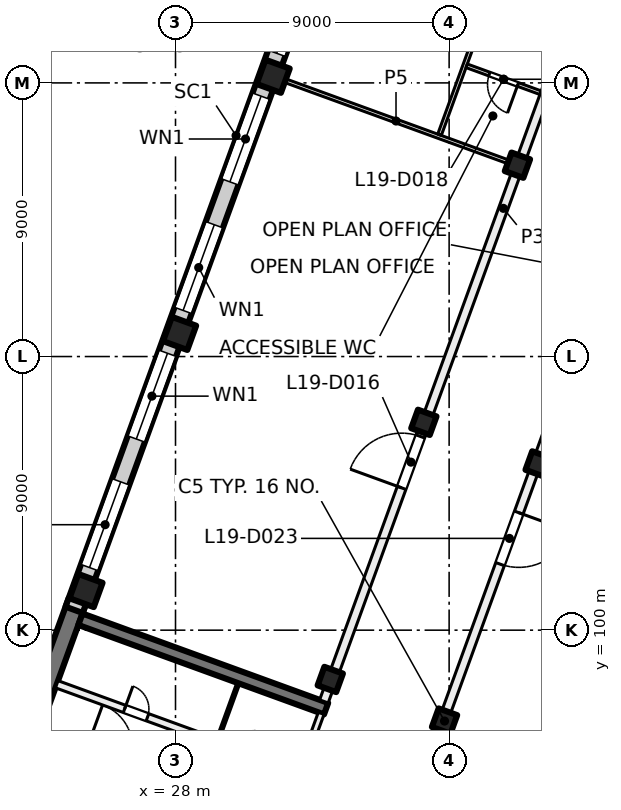
"""IFC4 building model, lengths in metres.
Left out: names, types, materials, properties, quantities, classifications, styles, units other than length and angle.
Written with IfcOpenShell. Run it as: python <this file> out.ifc"""

import sys

from ifc_helpers import new_model, si_unit, direction, frame, frame_2d, origin, origin_2d, place, context, subcontext, project, spatial, rectangle, extrude, element, fill, save


model = new_model("IFC4")
c1 = context("Model", 3, precision=1e-05, world=origin(), true_north=direction((0.0, 1.0)))
c2 = subcontext(c1, "Body", "Model", "MODEL_VIEW")
j1 = project(units=[si_unit("LENGTHUNIT", "METRE"), si_unit("PLANEANGLEUNIT", "RADIAN")], contexts=[c1])
p1 = place(None, origin())
s1 = spatial("IfcSite", under=j1, at=p1, CompositionType="ELEMENT")
p2 = place(p1, origin())
s2 = spatial("IfcBuilding", under=s1, at=p2, CompositionType="ELEMENT")
p3 = place(p2, frame((0.0, 0.0, 85.0)))
s3 = spatial("IfcBuildingStorey", under=s2, at=p3, CompositionType="ELEMENT", Elevation=85.0)
for number, where, z_axis, x_axis in (
    (1, (39.927, 105.468, 0.0), (0.0, 0.0, 1.0), (-0.342, -0.94, 0.0)),
    (2, (36.849, 97.011, 0.0), (0.0, 0.0, 1.0), (-0.342, -0.94, 0.0)),
    (3, (39.247, 115.293, 0.0), (0.0, 0.0, 1.0), (-0.342, -0.94, 0.0)),
    (4, (36.169, 106.836, 0.0), (0.0, 0.0, 1.0), (-0.342, -0.94, 0.0)),
    (5, (33.091, 98.379, 0.0), (0.0, 0.0, 1.0), (-0.342, -0.94, 0.0)),
):
    element("IfcColumn", number, at=place(p3, frame(where, z_axis=z_axis, x_axis=x_axis)), inside=s3, PredefinedType="COLUMN", context=c2, shape_type="SweptSolid", body=[
        extrude(rectangle(XDim=0.65, YDim=0.65, at=origin_2d()), origin(), (0.0, 0.0, 1.0), 4.0),
    ])
for number, where, z_axis, x_axis in (
    (6, (31.212, 118.218, 0.0), (0.0, 0.0, 1.0), (-0.342, -0.94, 0.0)),
    (7, (28.134, 109.76, 0.0), (0.0, 0.0, 1.0), (-0.342, -0.94, 0.0)),
    (8, (25.056, 101.303, 0.0), (0.0, 0.0, 1.0), (-0.342, -0.94, 0.0)),
):
    element("IfcColumn", number, at=place(p3, frame(where, z_axis=z_axis, x_axis=x_axis)), inside=s3, PredefinedType="COLUMN", context=c2, shape_type="SweptSolid", body=[
        extrude(rectangle(XDim=0.85, YDim=0.85, at=origin_2d()), origin(), (0.0, 0.0, 1.0), 4.0),
    ])
p4 = place(p3, frame((21.717, 92.568, 0.0), z_axis=(0.0, 0.0, 1.0), x_axis=(0.342017595281, 0.939693548195, 0.0)))
e9 = element("IfcWall", 9, at=p4, inside=s3, PredefinedType="SHEAR", context=c2, shape_type="SweptSolid", body=[
    extrude(rectangle(XDim=8.925, YDim=0.6, at=frame_2d((4.462, 0.0))), origin(), (0.0, 0.0, 1.0), 4.0),
])
p5 = place(p3, frame((32.953, 97.418, 0.0), z_axis=(0.0, 0.0, 1.0), x_axis=(-0.93969060187, 0.342025690201, 0.0)))
e10 = element("IfcWall", 10, at=p5, inside=s3, PredefinedType="SHEAR", context=c2, shape_type="SweptSolid", body=[
    extrude(rectangle(XDim=8.6, YDim=0.4, at=frame_2d((4.3, 0.0))), origin(), (0.0, 0.0, 1.0), 4.0),
])
p6 = place(p3, frame((24.666, 100.669, 0.0), z_axis=(0.0, 0.0, 1.0), x_axis=(0.34201964167, 0.939692803373, 0.0)))
e11 = element("IfcWall", 11, at=p6, inside=s3, PredefinedType="SOLIDWALL", context=c2, shape_type="SweptSolid", body=[
    extrude(rectangle(XDim=32.884, YDim=0.6, at=frame_2d((16.442, 0.0))), origin(), (0.0, 0.0, 1.0), 3.625),
])
p7 = place(p6, frame((1.48, 0.0, 0.9)))
e12 = element("IfcOpeningElement", 12, at=p7, cuts=e11, PredefinedType="OPENING", context=c2, shape_type="SweptSolid", body=[
    extrude(rectangle(XDim=3.0, YDim=2.4, at=frame_2d((1.5, 1.2))), frame((0.0, 0.31, 0.0), z_axis=(0.0, -1.0, 0.0), x_axis=(1.0, 0.0, 0.0)), (0.0, 0.0, 1.0), 0.62),
])
p8 = place(p6, frame((5.98, 0.0, 0.9)))
e13 = element("IfcOpeningElement", 13, at=p8, cuts=e11, PredefinedType="OPENING", context=c2, shape_type="SweptSolid", body=[
    extrude(rectangle(XDim=3.0, YDim=2.4, at=frame_2d((1.5, 1.2))), frame((0.0, 0.31, 0.0), z_axis=(0.0, -1.0, 0.0), x_axis=(1.0, 0.0, 0.0)), (0.0, 0.0, 1.0), 0.62),
])
p9 = place(p6, frame((10.48, 0.0, 0.9)))
e14 = element("IfcOpeningElement", 14, at=p9, cuts=e11, PredefinedType="OPENING", context=c2, shape_type="SweptSolid", body=[
    extrude(rectangle(XDim=3.0, YDim=2.4, at=frame_2d((1.5, 1.2))), frame((0.0, 0.31, 0.0), z_axis=(0.0, -1.0, 0.0), x_axis=(1.0, 0.0, 0.0)), (0.0, 0.0, 1.0), 0.62),
])
p10 = place(p6, frame((14.98, 0.0, 0.9)))
e15 = element("IfcOpeningElement", 15, at=p10, cuts=e11, PredefinedType="OPENING", context=c2, shape_type="SweptSolid", body=[
    extrude(rectangle(XDim=3.0, YDim=2.4, at=frame_2d((1.5, 1.2))), frame((0.0, 0.31, 0.0), z_axis=(0.0, -1.0, 0.0), x_axis=(1.0, 0.0, 0.0)), (0.0, 0.0, 1.0), 0.62),
])
p11 = place(p6, frame((19.48, 0.0, 0.9)))
e16 = element("IfcOpeningElement", 16, at=p11, cuts=e11, PredefinedType="OPENING", context=c2, shape_type="SweptSolid", body=[
    extrude(rectangle(XDim=3.0, YDim=2.4, at=frame_2d((1.5, 1.2))), frame((0.0, 0.31, 0.0), z_axis=(0.0, -1.0, 0.0), x_axis=(1.0, 0.0, 0.0)), (0.0, 0.0, 1.0), 0.62),
])
p12 = place(p6, frame((23.98, 0.0, 0.9)))
e17 = element("IfcOpeningElement", 17, at=p12, cuts=e11, PredefinedType="OPENING", context=c2, shape_type="SweptSolid", body=[
    extrude(rectangle(XDim=3.0, YDim=2.4, at=frame_2d((1.5, 1.2))), frame((0.0, 0.31, 0.0), z_axis=(0.0, -1.0, 0.0), x_axis=(1.0, 0.0, 0.0)), (0.0, 0.0, 1.0), 0.62),
])
p13 = place(p6, frame((28.48, 0.0, 0.9)))
e18 = element("IfcOpeningElement", 18, at=p13, cuts=e11, PredefinedType="OPENING", context=c2, shape_type="SweptSolid", body=[
    extrude(rectangle(XDim=3.0, YDim=2.4, at=frame_2d((1.5, 1.2))), frame((0.0, 0.31, 0.0), z_axis=(0.0, -1.0, 0.0), x_axis=(1.0, 0.0, 0.0)), (0.0, 0.0, 1.0), 0.62),
])
p14 = place(p3, frame((31.491, 93.693, 0.0), z_axis=(0.0, 0.0, 1.0), x_axis=(0.341995824804, 0.939701471648, 0.0)))
e19 = element("IfcWall", 19, at=p14, inside=s3, PredefinedType="PARTITIONING", context=c2, shape_type="SweptSolid", body=[
    extrude(rectangle(XDim=3.8, YDim=0.2, at=frame_2d((1.9, 0.0))), origin(), (0.0, 0.0, 1.0), 3.625),
])
p15 = place(p14, frame((0.3, 0.0, 0.0)))
e20 = element("IfcOpeningElement", 20, at=p15, cuts=e19, PredefinedType="OPENING", context=c2, shape_type="SweptSolid", body=[
    extrude(rectangle(XDim=1.2, YDim=2.1, at=frame_2d((0.6, 1.05))), frame((0.0, 0.11, 0.0), z_axis=(0.0, -1.0, 0.0), x_axis=(1.0, 0.0, 0.0)), (0.0, 0.0, 1.0), 0.22),
])
p16 = place(p3, frame((23.538, 96.694, 0.0), z_axis=(0.0, 0.0, 1.0), x_axis=(0.939691552312, -0.342023078919, 0.0)))
e21 = element("IfcWall", 21, at=p16, inside=s3, PredefinedType="PARTITIONING", context=c2, shape_type="SweptSolid", body=[
    extrude(rectangle(XDim=8.4, YDim=0.2, at=frame_2d((4.2, 0.0))), origin(), (0.0, 0.0, 1.0), 3.625),
])
p17 = place(p16, frame((1.65, 0.0, 0.0)))
e22 = element("IfcOpeningElement", 22, at=p17, cuts=e21, PredefinedType="OPENING", context=c2, shape_type="SweptSolid", body=[
    extrude(rectangle(XDim=1.5, YDim=2.1, at=frame_2d((0.75, 1.05))), frame((0.0, 0.11, 0.0), z_axis=(0.0, -1.0, 0.0), x_axis=(1.0, 0.0, 0.0)), (0.0, 0.0, 1.0), 0.22),
])
p18 = place(p3, frame((24.094, 98.221, 0.0), z_axis=(0.0, 0.0, 1.0), x_axis=(0.939691552312, -0.342023078919, 0.0)))
e23 = element("IfcWall", 23, at=p18, inside=s3, PredefinedType="PARTITIONING", context=c2, shape_type="SweptSolid", body=[
    extrude(rectangle(XDim=8.4, YDim=0.25, at=frame_2d((4.2, 0.0))), origin(), (0.0, 0.0, 1.0), 3.625),
])
p19 = place(p18, frame((6.625, 0.0, 0.0)))
e24 = element("IfcOpeningElement", 24, at=p19, cuts=e23, PredefinedType="OPENING", context=c2, shape_type="SweptSolid", body=[
    extrude(rectangle(XDim=0.8, YDim=2.1, at=frame_2d((0.4, 1.05))), frame((0.0, 0.135, 0.0), z_axis=(0.0, -1.0, 0.0), x_axis=(1.0, 0.0, 0.0)), (0.0, 0.0, 1.0), 0.27),
])
p20 = place(p18, frame((2.375, 0.0, 0.0)))
e25 = element("IfcOpeningElement", 25, at=p20, cuts=e23, PredefinedType="OPENING", context=c2, shape_type="SweptSolid", body=[
    extrude(rectangle(XDim=0.8, YDim=2.1, at=frame_2d((0.4, 1.05))), frame((0.0, 0.135, 0.0), z_axis=(0.0, -1.0, 0.0), x_axis=(1.0, 0.0, 0.0)), (0.0, 0.0, 1.0), 0.27),
])
p21 = place(p3, frame((29.399, 96.424, 0.0), z_axis=(0.0, 0.0, 1.0), x_axis=(0.341913947243, 0.939731266204, 0.0)))
e26 = element("IfcWall", 26, at=p21, inside=s3, PredefinedType="PARTITIONING", context=c2, shape_type="SweptSolid", body=[
    extrude(rectangle(XDim=1.95, YDim=0.1, at=frame_2d((0.975, 0.0))), origin(), (0.0, 0.0, 1.0), 3.625),
])
p22 = place(p3, frame((31.353, 118.166, 0.0), z_axis=(0.0, 0.0, 1.0), x_axis=(0.939687752599, -0.342033518263, 0.0)))
e27 = element("IfcWall", 27, at=p22, inside=s3, PredefinedType="PARTITIONING", context=c2, shape_type="SweptSolid", body=[
    extrude(rectangle(XDim=8.301, YDim=0.125, at=frame_2d((4.15, 0.0))), origin(), (0.0, 0.0, 1.0), 3.625),
])
p23 = place(p3, frame((32.881, 97.657, 0.0), z_axis=(0.0, 0.0, 1.0), x_axis=(0.342017360004, 0.939693633828, 0.0)))
e28 = element("IfcWall", 28, at=p23, inside=s3, PredefinedType="PARTITIONING", context=c2, shape_type="SweptSolid", body=[
    extrude(rectangle(XDim=34.516, YDim=0.3, at=frame_2d((17.258, 0.0))), origin(), (0.0, 0.0, 1.0), 3.625),
])
p24 = place(p23, frame((7.475, 0.0, 0.0)))
e29 = element("IfcOpeningElement", 29, at=p24, cuts=e28, PredefinedType="OPENING", context=c2, shape_type="SweptSolid", body=[
    extrude(rectangle(XDim=1.8, YDim=2.1, at=frame_2d((0.9, 1.05))), frame((0.0, 0.16, 0.0), z_axis=(0.0, -1.0, 0.0), x_axis=(1.0, 0.0, 0.0)), (0.0, 0.0, 1.0), 0.32),
])
p25 = place(p23, frame((24.0, 0.0, 0.0)))
e30 = element("IfcOpeningElement", 30, at=p25, cuts=e28, PredefinedType="OPENING", context=c2, shape_type="SweptSolid", body=[
    extrude(rectangle(XDim=1.0, YDim=2.1, at=frame_2d((0.5, 1.05))), frame((0.0, 0.16, 0.0), z_axis=(0.0, -1.0, 0.0), x_axis=(1.0, 0.0, 0.0)), (0.0, 0.0, 1.0), 0.32),
])
p26 = place(p3, frame((36.684, 116.293, 0.0), z_axis=(0.0, 0.0, 1.0), x_axis=(0.342089829483, 0.939667254173, 0.0)))
e31 = element("IfcWall", 31, at=p26, inside=s3, PredefinedType="PARTITIONING", context=c2, shape_type="SweptSolid", body=[
    extrude(rectangle(XDim=8.875, YDim=0.125, at=frame_2d((4.437, 0.0))), origin(), (0.0, 0.0, 1.0), 3.625),
])
p27 = place(p26, frame((6.266, 0.0, 0.0)))
e32 = element("IfcOpeningElement", 32, at=p27, cuts=e31, PredefinedType="OPENING", context=c2, shape_type="SweptSolid", body=[
    extrude(rectangle(XDim=0.8, YDim=2.1, at=frame_2d((0.4, 1.05))), frame((0.0, 0.073, 0.0), z_axis=(0.0, -1.0, 0.0), x_axis=(1.0, 0.0, 0.0)), (0.0, 0.0, 1.0), 0.145),
])
p28 = place(p26, frame((3.036, 0.0, 0.0)))
e33 = element("IfcOpeningElement", 33, at=p28, cuts=e31, PredefinedType="OPENING", context=c2, shape_type="SweptSolid", body=[
    extrude(rectangle(XDim=0.8, YDim=2.1, at=frame_2d((0.4, 1.05))), frame((0.0, 0.073, 0.0), z_axis=(0.0, -1.0, 0.0), x_axis=(1.0, 0.0, 0.0)), (0.0, 0.0, 1.0), 0.145),
])
p29 = place(p3, frame((40.008, 117.677, 0.0), z_axis=(0.0, 0.0, 1.0), x_axis=(-0.939674895655, 0.342068838798, 0.0)))
e34 = element("IfcWall", 34, at=p29, inside=s3, PredefinedType="PARTITIONING", context=c2, shape_type="SweptSolid", body=[
    extrude(rectangle(XDim=2.587, YDim=0.125, at=frame_2d((1.293, 0.0))), origin(), (0.0, 0.0, 1.0), 3.625),
])
p30 = place(p29, frame((0.793, 0.0, 0.0)))
e35 = element("IfcOpeningElement", 35, at=p30, cuts=e34, PredefinedType="OPENING", context=c2, shape_type="SweptSolid", body=[
    extrude(rectangle(XDim=1.0, YDim=2.1, at=frame_2d((0.5, 1.05))), frame((0.0, 0.073, 0.0), z_axis=(0.0, -1.0, 0.0), x_axis=(1.0, 0.0, 0.0)), (0.0, 0.0, 1.0), 0.145),
])
p31 = place(p3, frame((47.314, 125.909, 0.0), z_axis=(0.0, 0.0, 1.0), x_axis=(-0.342010770371, -0.939696032209, 0.0)))
e36 = element("IfcWall", 36, at=p31, inside=s3, PredefinedType="PARTITIONING", context=c2, shape_type="SweptSolid", body=[
    extrude(rectangle(XDim=31.485, YDim=0.3, at=frame_2d((15.742, 0.0))), origin(), (0.0, 0.0, 1.0), 3.625),
])
p32 = place(p31, frame((23.459, 0.0, 0.0)))
e37 = element("IfcOpeningElement", 37, at=p32, cuts=e36, PredefinedType="OPENING", context=c2, shape_type="SweptSolid", body=[
    extrude(rectangle(XDim=1.8, YDim=2.1, at=frame_2d((0.9, 1.05))), frame((0.0, 0.16, 0.0), z_axis=(0.0, -1.0, 0.0), x_axis=(1.0, 0.0, 0.0)), (0.0, 0.0, 1.0), 0.32),
])
p33 = place(p31, frame((5.484, 0.0, 0.0)))
e38 = element("IfcOpeningElement", 38, at=p33, cuts=e36, PredefinedType="OPENING", context=c2, shape_type="SweptSolid", body=[
    extrude(rectangle(XDim=1.0, YDim=2.1, at=frame_2d((0.5, 1.05))), frame((0.0, 0.16, 0.0), z_axis=(0.0, -1.0, 0.0), x_axis=(1.0, 0.0, 0.0)), (0.0, 0.0, 1.0), 0.32),
])
p34 = place(p7, origin())
e39 = element("IfcWindow", 39, at=p34, inside=s3, PartitioningType="SINGLE_PANEL", PredefinedType="WINDOW", context=c2, shape_type="SweptSolid", body=[
    extrude(rectangle(XDim=3.0, YDim=2.4, at=frame_2d((1.5, 1.2))), frame((0.0, 0.03, 0.0), z_axis=(0.0, -1.0, 0.0), x_axis=(1.0, 0.0, 0.0)), (0.0, 0.0, 1.0), 0.06),
])
fill(e12, e39)
p35 = place(p8, origin())
e40 = element("IfcWindow", 40, at=p35, inside=s3, PartitioningType="SINGLE_PANEL", PredefinedType="WINDOW", context=c2, shape_type="SweptSolid", body=[
    extrude(rectangle(XDim=3.0, YDim=2.4, at=frame_2d((1.5, 1.2))), frame((0.0, 0.03, 0.0), z_axis=(0.0, -1.0, 0.0), x_axis=(1.0, 0.0, 0.0)), (0.0, 0.0, 1.0), 0.06),
])
fill(e13, e40)
p36 = place(p9, origin())
e41 = element("IfcWindow", 41, at=p36, inside=s3, PartitioningType="SINGLE_PANEL", PredefinedType="WINDOW", context=c2, shape_type="SweptSolid", body=[
    extrude(rectangle(XDim=3.0, YDim=2.4, at=frame_2d((1.5, 1.2))), frame((0.0, 0.03, 0.0), z_axis=(0.0, -1.0, 0.0), x_axis=(1.0, 0.0, 0.0)), (0.0, 0.0, 1.0), 0.06),
])
fill(e14, e41)
p37 = place(p10, origin())
e42 = element("IfcWindow", 42, at=p37, inside=s3, PartitioningType="SINGLE_PANEL", PredefinedType="WINDOW", context=c2, shape_type="SweptSolid", body=[
    extrude(rectangle(XDim=3.0, YDim=2.4, at=frame_2d((1.5, 1.2))), frame((0.0, 0.03, 0.0), z_axis=(0.0, -1.0, 0.0), x_axis=(1.0, 0.0, 0.0)), (0.0, 0.0, 1.0), 0.06),
])
fill(e15, e42)
p38 = place(p11, origin())
e43 = element("IfcWindow", 43, at=p38, inside=s3, PartitioningType="SINGLE_PANEL", PredefinedType="WINDOW", context=c2, shape_type="SweptSolid", body=[
    extrude(rectangle(XDim=3.0, YDim=2.4, at=frame_2d((1.5, 1.2))), frame((0.0, 0.03, 0.0), z_axis=(0.0, -1.0, 0.0), x_axis=(1.0, 0.0, 0.0)), (0.0, 0.0, 1.0), 0.06),
])
fill(e16, e43)
p39 = place(p20, origin())
e44 = element("IfcDoor", 44, at=p39, inside=s3, OperationType="SINGLE_SWING_RIGHT", PredefinedType="DOOR", context=c2, shape_type="SweptSolid", body=[
    extrude(rectangle(XDim=0.8, YDim=2.1, at=frame_2d((0.4, 1.05))), frame((0.0, 0.025, 0.0), z_axis=(0.0, -1.0, 0.0), x_axis=(1.0, 0.0, 0.0)), (0.0, 0.0, 1.0), 0.05),
])
fill(e25, e44)
p40 = place(p24, origin())
e45 = element("IfcDoor", 45, at=p40, inside=s3, OperationType="DOUBLE_DOOR_SINGLE_SWING", PredefinedType="DOOR", context=c2, shape_type="SweptSolid", body=[
    extrude(rectangle(XDim=1.8, YDim=2.1, at=frame_2d((0.9, 1.05))), frame((0.0, 0.025, 0.0), z_axis=(0.0, -1.0, 0.0), x_axis=(1.0, 0.0, 0.0)), (0.0, 0.0, 1.0), 0.05),
])
fill(e29, e45)
p41 = place(p30, origin())
e46 = element("IfcDoor", 46, at=p41, inside=s3, OperationType="SINGLE_SWING_LEFT", PredefinedType="DOOR", context=c2, shape_type="SweptSolid", body=[
    extrude(rectangle(XDim=1.0, YDim=2.1, at=frame_2d((0.5, 1.05))), frame((0.0, 0.025, 0.0), z_axis=(0.0, -1.0, 0.0), x_axis=(1.0, 0.0, 0.0)), (0.0, 0.0, 1.0), 0.05),
])
fill(e35, e46)
p42 = place(p32, origin())
e47 = element("IfcDoor", 47, at=p42, inside=s3, OperationType="DOUBLE_DOOR_SINGLE_SWING", PredefinedType="DOOR", context=c2, shape_type="SweptSolid", body=[
    extrude(rectangle(XDim=1.8, YDim=2.1, at=frame_2d((0.9, 1.05))), frame((0.0, 0.025, 0.0), z_axis=(0.0, -1.0, 0.0), x_axis=(1.0, 0.0, 0.0)), (0.0, 0.0, 1.0), 0.05),
])
fill(e37, e47)
save(model, sys.argv[1])
